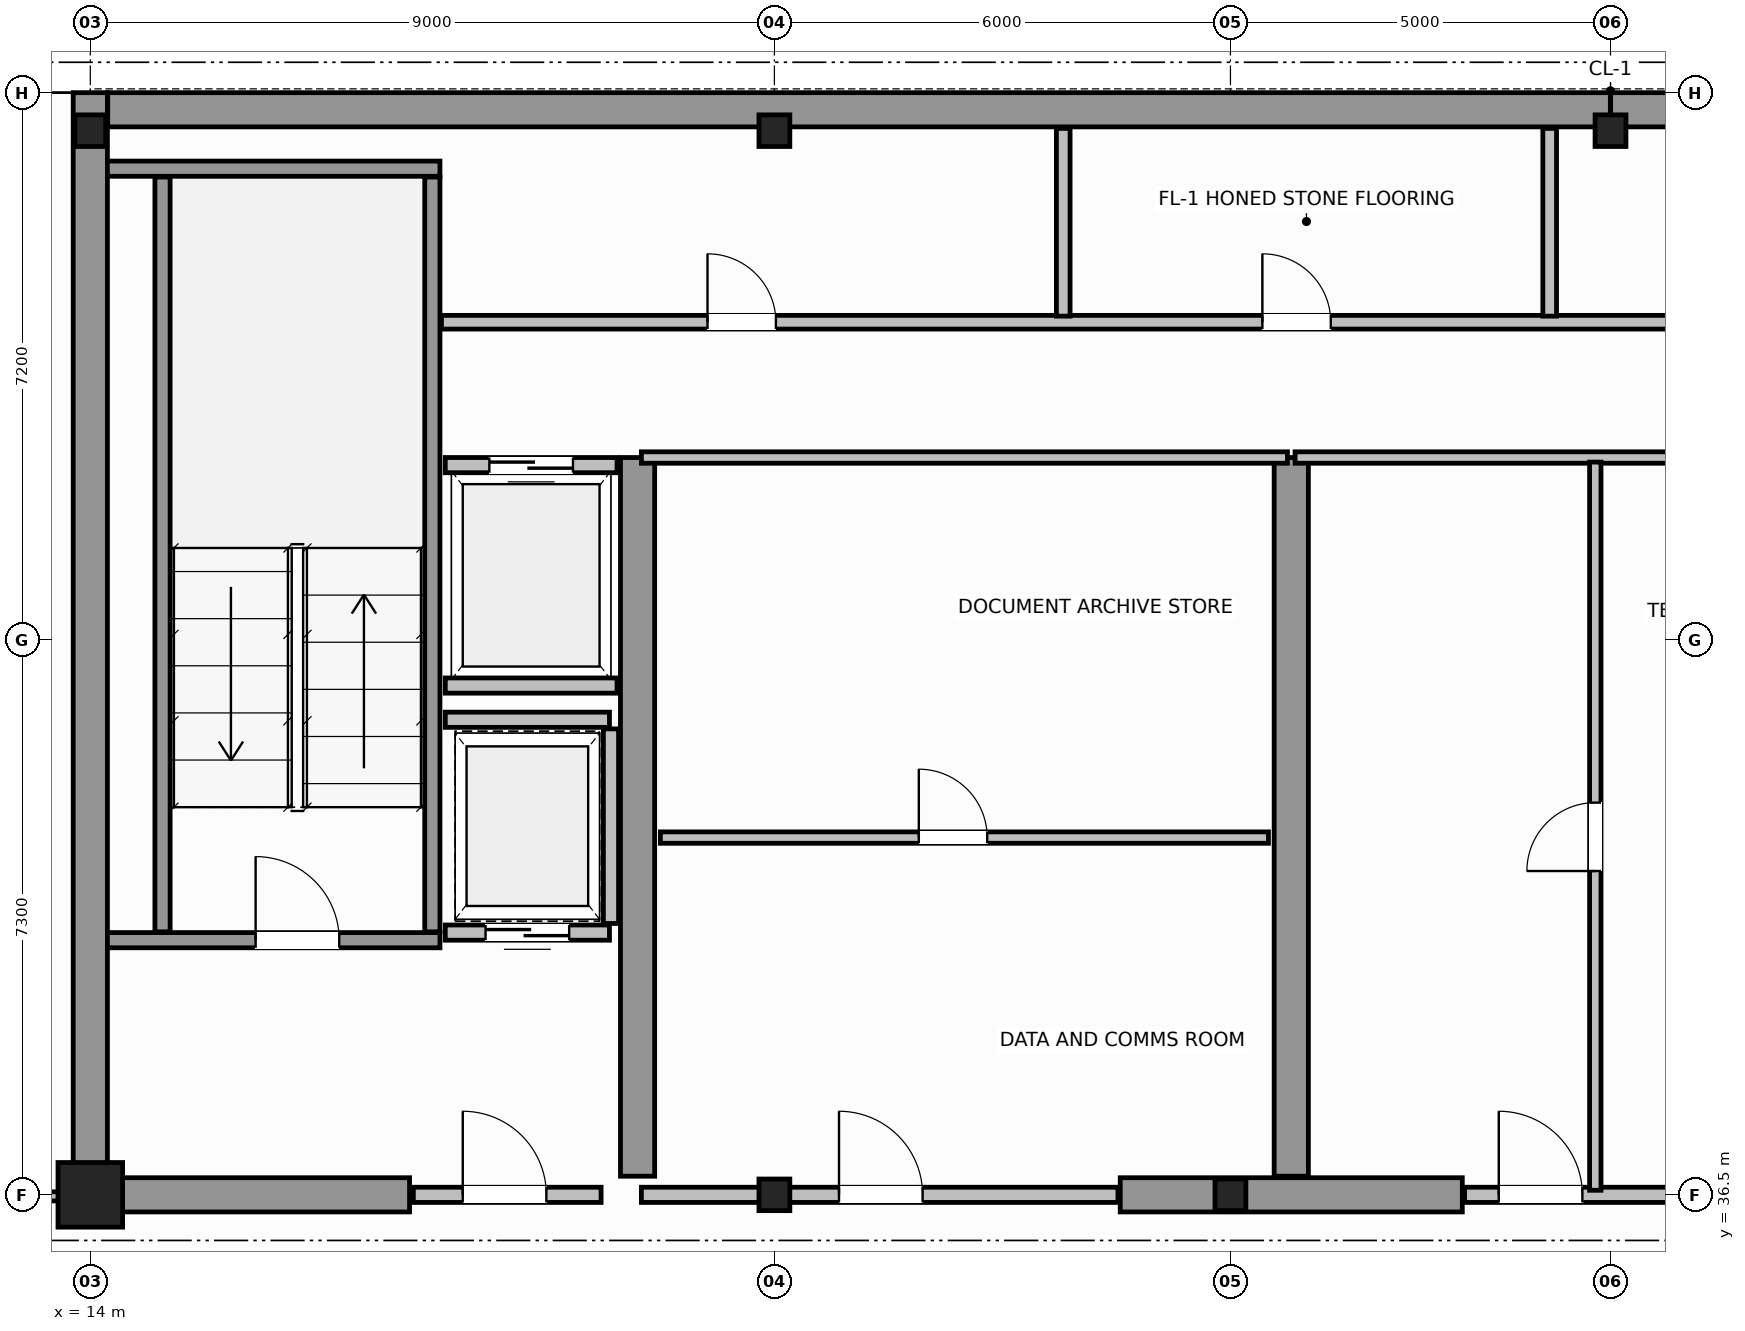
"""IFC4 building model, lengths in metres.
Left out: names, types, materials, properties, quantities, classifications, styles, units other than length and angle.
Written with IfcOpenShell. Run it as: python <this file> out.ifc"""

import sys

from ifc_helpers import new_model, si_unit, direction, frame, frame_2d, origin, origin_2d, place, context, subcontext, project, spatial, rectangle, i_section, extrude, source, transform, mapped, element, fill, save


model = new_model("IFC4")
c1 = context("Model", 3, precision=1e-05, world=origin(), true_north=direction((0.0, 1.0)))
c2 = subcontext(c1, "Body", "Model", "MODEL_VIEW")
j1 = project(units=[si_unit("LENGTHUNIT", "METRE"), si_unit("PLANEANGLEUNIT", "RADIAN")], contexts=[c1])
p1 = place(None, origin())
s1 = spatial("IfcSite", under=j1, at=p1, CompositionType="ELEMENT")
p2 = place(p1, origin())
s2 = spatial("IfcBuilding", under=s1, at=p2, CompositionType="ELEMENT")
p3 = place(p2, frame((0.0, 0.0, 272.6)))
s3 = spatial("IfcBuildingStorey", under=s2, at=p3, CompositionType="ELEMENT", Elevation=272.6)
m1 = source(origin(), c2, "Body", "SweptSolid", [
    extrude(rectangle(XDim=0.85, YDim=0.85, at=origin_2d()), origin(), (0.0, 0.0, 1.0), 3.8),
])
p4 = place(p3, frame((14.0, 36.5, 0.0), z_axis=(0.0, 0.0, 1.0), x_axis=(1.0, 0.0, 0.0)))
e1 = element("IfcColumn", 1, at=p4, inside=s3, PredefinedType="COLUMN", context=c2, shape_type="MappedRepresentation", body=[
    mapped(m1, transform((0.0, 0.0, 0.0), scale=1.0)),
])
m2 = source(origin(), c2, "Body", "SweptSolid", [
    extrude(i_section(OverallWidth=0.406, OverallDepth=0.416, WebThickness=0.03, FlangeThickness=0.042, FilletRadius=0.015, at=origin_2d()), origin(), (0.0, 0.0, 1.0), 3.8),
])
for number, where, z_axis, x_axis in (
    (2, (23.0, 36.5, 0.0), (0.0, 0.0, 1.0), (1.0, 0.0, 0.0)),
    (3, (29.0, 36.5, 0.0), (0.0, 0.0, 1.0), (1.0, 0.0, 0.0)),
    (4, (14.0, 50.5, 0.0), (0.0, 0.0, 1.0), (1.0, 0.0, 0.0)),
    (5, (23.0, 50.5, 0.0), (0.0, 0.0, 1.0), (1.0, 0.0, 0.0)),
    (6, (34.0, 50.5, 0.0), (0.0, 0.0, 1.0), (1.0, 0.0, 0.0)),
):
    element("IfcColumn", number, at=place(p3, frame(where, z_axis=z_axis, x_axis=x_axis)), inside=s3, PredefinedType="COLUMN", context=c2, shape_type="MappedRepresentation", body=[
        mapped(m2, transform((0.0, 0.0, 0.0), scale=1.0)),
    ])
for number, where, z_axis, x_axis in (
    (7, (14.229, 50.775, 0.0), (0.0, 0.0, 1.0), (1.0, 0.0, 0.0)),
    (8, (34.002, 50.775, 0.0), (0.0, 0.0, 1.0), (1.0, 0.0, 0.0)),
):
    element("IfcWall", number, at=place(p3, frame(where, z_axis=z_axis, x_axis=x_axis)), inside=s3, PredefinedType="SHEAR", context=c2, shape_type="SweptSolid", body=[
        extrude(rectangle(XDim=19.769, YDim=0.45, at=frame_2d((9.885, 0.0))), origin(), (0.0, 0.0, 1.0), 3.8),
    ])
p5 = place(p3, frame((14.0, 36.5, 0.0), z_axis=(0.0, 0.0, 1.0), x_axis=(0.0, 1.0, 0.0)))
e9 = element("IfcWall", 9, at=p5, inside=s3, PredefinedType="SHEAR", context=c2, shape_type="SweptSolid", body=[
    extrude(rectangle(XDim=14.5, YDim=0.45, at=frame_2d((7.25, 0.0))), origin(), (0.0, 0.0, 1.0), 3.8),
])
p6 = place(p3, frame((14.245, 36.5, 0.0), z_axis=(0.0, 0.0, 1.0), x_axis=(1.0, 0.0, 0.0)))
e10 = element("IfcWall", 10, at=p6, inside=s3, PredefinedType="SHEAR", context=c2, shape_type="SweptSolid", body=[
    extrude(rectangle(XDim=3.955, YDim=0.45, at=frame_2d((1.978, 0.0))), origin(), (0.0, 0.0, 1.0), 2.58),
])
p7 = place(p3, frame((27.55, 36.5, 0.0), z_axis=(0.0, 0.0, 1.0), x_axis=(1.0, 0.0, 0.0)))
e11 = element("IfcWall", 11, at=p7, inside=s3, PredefinedType="SHEAR", context=c2, shape_type="SweptSolid", body=[
    extrude(rectangle(XDim=4.5, YDim=0.45, at=frame_2d((2.25, 0.0))), origin(), (0.0, 0.0, 1.0), 3.8),
])
for number, where, z_axis, x_axis in (
    (12, (21.2, 36.745, 0.0), (0.0, 0.0, 1.0), (0.0, 1.0, 0.0)),
    (13, (29.8, 36.745, 0.0), (0.0, 0.0, 1.0), (0.0, 1.0, 0.0)),
):
    element("IfcWall", number, at=place(p3, frame(where, z_axis=z_axis, x_axis=x_axis)), inside=s3, PredefinedType="SHEAR", context=c2, shape_type="SweptSolid", body=[
        extrude(rectangle(XDim=9.455, YDim=0.45, at=frame_2d((4.728, 0.0))), origin(), (0.0, 0.0, 1.0), 3.8),
    ])
p8 = place(p3, frame((14.225, 39.85, 0.0), z_axis=(0.0, 0.0, 1.0), x_axis=(1.0, 0.0, 0.0)))
e14 = element("IfcWall", 14, at=p8, inside=s3, PredefinedType="SOLIDWALL", context=c2, shape_type="SweptSolid", body=[
    extrude(rectangle(XDim=4.375, YDim=0.2, at=frame_2d((2.188, 0.0))), origin(), (0.0, 0.0, 1.0), 3.8),
])
p9 = place(p8, frame((1.95, 0.0, 0.0)))
e15 = element("IfcOpeningElement", 15, at=p9, cuts=e14, PredefinedType="OPENING", context=c2, shape_type="SweptSolid", body=[
    extrude(rectangle(XDim=1.1, YDim=2.15, at=frame_2d((0.55, 1.075))), frame((0.0, 0.11, 0.0), z_axis=(0.0, -1.0, 0.0), x_axis=(1.0, 0.0, 0.0)), (0.0, 0.0, 1.0), 0.22),
])
p10 = place(p3, frame((14.225, 50.0, 0.0), z_axis=(0.0, 0.0, 1.0), x_axis=(1.0, 0.0, 0.0)))
e16 = element("IfcWall", 16, at=p10, inside=s3, PredefinedType="SOLIDWALL", context=c2, shape_type="SweptSolid", body=[
    extrude(rectangle(XDim=4.375, YDim=0.2, at=frame_2d((2.188, 0.0))), origin(), (0.0, 0.0, 1.0), 3.8),
])
for number, where, z_axis, x_axis in (
    (17, (14.95, 39.96, 0.0), (0.0, 0.0, 1.0), (0.0, 1.0, 0.0)),
    (18, (18.5, 39.96, 0.0), (0.0, 0.0, 1.0), (0.0, 1.0, 0.0)),
):
    element("IfcWall", number, at=place(p3, frame(where, z_axis=z_axis, x_axis=x_axis)), inside=s3, PredefinedType="SOLIDWALL", context=c2, shape_type="SweptSolid", body=[
        extrude(rectangle(XDim=9.93, YDim=0.2, at=frame_2d((4.965, 0.0))), origin(), (0.0, 0.0, 1.0), 3.8),
    ])
p11 = place(p3, frame((18.25, 36.5, 0.0), z_axis=(0.0, 0.0, 1.0), x_axis=(1.0, 0.0, 0.0)))
e19 = element("IfcWall", 19, at=p11, inside=s3, PredefinedType="SOLIDWALL", context=c2, shape_type="SweptSolid", body=[
    extrude(rectangle(XDim=2.47, YDim=0.2, at=frame_2d((1.235, 0.0))), origin(), (0.0, 0.0, 1.0), 2.57),
])
p12 = place(p11, frame((0.65, 0.0, 0.0)))
e20 = element("IfcOpeningElement", 20, at=p12, cuts=e19, PredefinedType="OPENING", context=c2, shape_type="SweptSolid", body=[
    extrude(rectangle(XDim=1.1, YDim=2.15, at=frame_2d((0.55, 1.075))), frame((0.0, 0.11, 0.0), z_axis=(0.0, -1.0, 0.0), x_axis=(1.0, 0.0, 0.0)), (0.0, 0.0, 1.0), 0.22),
])
p13 = place(p3, frame((18.67, 46.1, 0.0), z_axis=(0.0, 0.0, 1.0), x_axis=(1.0, 0.0, 0.0)))
e21 = element("IfcWall", 21, at=p13, inside=s3, PredefinedType="SOLIDWALL", context=c2, shape_type="SweptSolid", body=[
    extrude(rectangle(XDim=2.26, YDim=0.2, at=frame_2d((1.13, 0.0))), origin(), (0.0, 0.0, 1.0), 3.58),
])
p14 = place(p13, frame((0.58, 0.0, 0.0)))
e22 = element("IfcOpeningElement", 22, at=p14, cuts=e21, PredefinedType="OPENING", context=c2, shape_type="SweptSolid", body=[
    extrude(rectangle(XDim=1.1, YDim=2.15, at=frame_2d((0.55, 1.075))), frame((0.0, 0.11, 0.0), z_axis=(0.0, -1.0, 0.0), x_axis=(1.0, 0.0, 0.0)), (0.0, 0.0, 1.0), 0.22),
])
p15 = place(p3, frame((18.67, 43.2, 0.0), z_axis=(0.0, 0.0, 1.0), x_axis=(1.0, 0.0, 0.0)))
e23 = element("IfcWall", 23, at=p15, inside=s3, PredefinedType="SOLIDWALL", context=c2, shape_type="SweptSolid", body=[
    extrude(rectangle(XDim=2.26, YDim=0.2, at=frame_2d((1.13, 0.0))), origin(), (0.0, 0.0, 1.0), 3.58),
])
p16 = place(p3, frame((18.67, 39.95, 0.0), z_axis=(0.0, 0.0, 1.0), x_axis=(1.0, 0.0, 0.0)))
e24 = element("IfcWall", 24, at=p16, inside=s3, PredefinedType="SOLIDWALL", context=c2, shape_type="SweptSolid", body=[
    extrude(rectangle(XDim=2.16, YDim=0.2, at=frame_2d((1.08, 0.0))), origin(), (0.0, 0.0, 1.0), 3.58),
])
p17 = place(p16, frame((0.53, 0.0, 0.0)))
e25 = element("IfcOpeningElement", 25, at=p17, cuts=e24, PredefinedType="OPENING", context=c2, shape_type="SweptSolid", body=[
    extrude(rectangle(XDim=1.1, YDim=2.15, at=frame_2d((0.55, 1.075))), frame((0.0, 0.11, 0.0), z_axis=(0.0, -1.0, 0.0), x_axis=(1.0, 0.0, 0.0)), (0.0, 0.0, 1.0), 0.22),
])
p18 = place(p3, frame((18.67, 42.75, 0.0), z_axis=(0.0, 0.0, 1.0), x_axis=(1.0, 0.0, 0.0)))
e26 = element("IfcWall", 26, at=p18, inside=s3, PredefinedType="SOLIDWALL", context=c2, shape_type="SweptSolid", body=[
    extrude(rectangle(XDim=2.16, YDim=0.2, at=frame_2d((1.08, 0.0))), origin(), (0.0, 0.0, 1.0), 3.58),
])
p19 = place(p3, frame((20.85, 40.07, 0.0), z_axis=(0.0, 0.0, 1.0), x_axis=(0.0, 1.0, 0.0)))
e27 = element("IfcWall", 27, at=p19, inside=s3, PredefinedType="SOLIDWALL", context=c2, shape_type="SweptSolid", body=[
    extrude(rectangle(XDim=2.56, YDim=0.2, at=frame_2d((1.28, 0.0))), origin(), (0.0, 0.0, 1.0), 3.58),
])
p20 = place(p3, frame((21.25, 36.5, 0.0), z_axis=(0.0, 0.0, 1.0), x_axis=(1.0, 0.0, 0.0)))
e28 = element("IfcWall", 28, at=p20, inside=s3, PredefinedType="SOLIDWALL", context=c2, shape_type="SweptSolid", body=[
    extrude(rectangle(XDim=6.27, YDim=0.2, at=frame_2d((3.135, 0.0))), origin(), (0.0, 0.0, 1.0), 2.57),
])
p21 = place(p20, frame((2.6, 0.0, 0.0)))
e29 = element("IfcOpeningElement", 29, at=p21, cuts=e28, PredefinedType="OPENING", context=c2, shape_type="SweptSolid", body=[
    extrude(rectangle(XDim=1.1, YDim=2.15, at=frame_2d((0.55, 1.075))), frame((0.0, 0.11, 0.0), z_axis=(0.0, -1.0, 0.0), x_axis=(1.0, 0.0, 0.0)), (0.0, 0.0, 1.0), 0.22),
])
p22 = place(p3, frame((21.25, 46.2, 0.0), z_axis=(0.0, 0.0, 1.0), x_axis=(1.0, 0.0, 0.0)))
e30 = element("IfcWall", 30, at=p22, inside=s3, PredefinedType="PARTITIONING", context=c2, shape_type="SweptSolid", body=[
    extrude(rectangle(XDim=8.5, YDim=0.15, at=frame_2d((4.25, 0.0))), origin(), (0.0, 0.0, 1.0), 3.58),
])
p23 = place(p3, frame((21.5, 41.2, 0.0), z_axis=(0.0, 0.0, 1.0), x_axis=(1.0, 0.0, 0.0)))
e31 = element("IfcWall", 31, at=p23, inside=s3, PredefinedType="PARTITIONING", context=c2, shape_type="SweptSolid", body=[
    extrude(rectangle(XDim=8.0, YDim=0.15, at=frame_2d((4.0, 0.0))), origin(), (0.0, 0.0, 1.0), 3.58),
])
p24 = place(p23, frame((3.4, 0.0, 0.0)))
e32 = element("IfcOpeningElement", 32, at=p24, cuts=e31, PredefinedType="OPENING", context=c2, shape_type="SweptSolid", body=[
    extrude(rectangle(XDim=0.9, YDim=2.1, at=frame_2d((0.45, 1.05))), frame((0.0, 0.085, 0.0), z_axis=(0.0, -1.0, 0.0), x_axis=(1.0, 0.0, 0.0)), (0.0, 0.0, 1.0), 0.17),
])
p25 = place(p3, frame((32.08, 36.5, 0.0), z_axis=(0.0, 0.0, 1.0), x_axis=(1.0, 0.0, 0.0)))
e33 = element("IfcWall", 33, at=p25, inside=s3, PredefinedType="SOLIDWALL", context=c2, shape_type="SweptSolid", body=[
    extrude(rectangle(XDim=4.04, YDim=0.2, at=frame_2d((2.02, 0.0))), origin(), (0.0, 0.0, 1.0), 3.02),
])
p26 = place(p25, frame((0.45, 0.0, 0.0)))
e34 = element("IfcOpeningElement", 34, at=p26, cuts=e33, PredefinedType="OPENING", context=c2, shape_type="SweptSolid", body=[
    extrude(rectangle(XDim=1.1, YDim=2.15, at=frame_2d((0.55, 1.075))), frame((0.0, 0.11, 0.0), z_axis=(0.0, -1.0, 0.0), x_axis=(1.0, 0.0, 0.0)), (0.0, 0.0, 1.0), 0.22),
])
p27 = place(p3, frame((29.85, 46.2, 0.0), z_axis=(0.0, 0.0, 1.0), x_axis=(1.0, 0.0, 0.0)))
e35 = element("IfcWall", 35, at=p27, inside=s3, PredefinedType="PARTITIONING", context=c2, shape_type="SweptSolid", body=[
    extrude(rectangle(XDim=8.5, YDim=0.15, at=frame_2d((4.25, 0.0))), origin(), (0.0, 0.0, 1.0), 3.58),
])
p28 = place(p3, frame((33.8, 36.56, 0.0), z_axis=(0.0, 0.0, 1.0), x_axis=(0.0, 1.0, 0.0)))
e36 = element("IfcWall", 36, at=p28, inside=s3, PredefinedType="PARTITIONING", context=c2, shape_type="SweptSolid", body=[
    extrude(rectangle(XDim=9.58, YDim=0.15, at=frame_2d((4.79, 0.0))), origin(), (0.0, 0.0, 1.0), 3.58),
])
p29 = place(p28, frame((4.2, 0.0, 0.0)))
e37 = element("IfcOpeningElement", 37, at=p29, cuts=e36, PredefinedType="OPENING", context=c2, shape_type="SweptSolid", body=[
    extrude(rectangle(XDim=0.9, YDim=2.1, at=frame_2d((0.45, 1.05))), frame((0.0, 0.085, 0.0), z_axis=(0.0, -1.0, 0.0), x_axis=(1.0, 0.0, 0.0)), (0.0, 0.0, 1.0), 0.17),
])
p30 = place(p3, frame((18.62, 47.98, 0.0), z_axis=(0.0, 0.0, 1.0), x_axis=(1.0, 0.0, 0.0)))
e38 = element("IfcWall", 38, at=p30, inside=s3, PredefinedType="PLUMBINGWALL", context=c2, shape_type="SweptSolid", body=[
    extrude(rectangle(XDim=20.06, YDim=0.18, at=frame_2d((10.03, 0.0))), origin(), (0.0, 0.0, 1.0), 3.58),
])
p31 = place(p30, frame((3.5, 0.0, 0.0)))
e39 = element("IfcOpeningElement", 39, at=p31, cuts=e38, PredefinedType="OPENING", context=c2, shape_type="SweptSolid", body=[
    extrude(rectangle(XDim=0.9, YDim=2.15, at=frame_2d((0.45, 1.075))), frame((0.0, 0.1, 0.0), z_axis=(0.0, -1.0, 0.0), x_axis=(1.0, 0.0, 0.0)), (0.0, 0.0, 1.0), 0.2),
])
p32 = place(p30, frame((10.8, 0.0, 0.0)))
e40 = element("IfcOpeningElement", 40, at=p32, cuts=e38, PredefinedType="OPENING", context=c2, shape_type="SweptSolid", body=[
    extrude(rectangle(XDim=0.9, YDim=2.15, at=frame_2d((0.45, 1.075))), frame((0.0, 0.1, 0.0), z_axis=(0.0, -1.0, 0.0), x_axis=(1.0, 0.0, 0.0)), (0.0, 0.0, 1.0), 0.2),
])
p33 = place(p30, frame((16.8, 0.0, 0.0)))
e41 = element("IfcOpeningElement", 41, at=p33, cuts=e38, PredefinedType="OPENING", context=c2, shape_type="SweptSolid", body=[
    extrude(rectangle(XDim=0.9, YDim=2.15, at=frame_2d((0.45, 1.075))), frame((0.0, 0.1, 0.0), z_axis=(0.0, -1.0, 0.0), x_axis=(1.0, 0.0, 0.0)), (0.0, 0.0, 1.0), 0.2),
])
for number, where, z_axis, x_axis in (
    (42, (26.8, 48.06, 0.0), (0.0, 0.0, 1.0), (0.0, 1.0, 0.0)),
    (43, (33.2, 48.06, 0.0), (0.0, 0.0, 1.0), (0.0, 1.0, 0.0)),
):
    element("IfcWall", number, at=place(p3, frame(where, z_axis=z_axis, x_axis=x_axis)), inside=s3, PredefinedType="PLUMBINGWALL", context=c2, shape_type="SweptSolid", body=[
        extrude(rectangle(XDim=2.47, YDim=0.18, at=frame_2d((1.235, 0.0))), origin(), (0.0, 0.0, 1.0), 3.58),
    ])
p34 = place(p3, frame((7.336, 36.48, 0.0), z_axis=(0.0, 0.0, 1.0), x_axis=(1.0, 0.0, 0.0)))
e44 = element("IfcWall", 44, at=p34, inside=s3, PredefinedType="PARTITIONING", context=c2, shape_type="SweptSolid", body=[
    extrude(rectangle(XDim=6.604, YDim=0.12, at=frame_2d((3.302, 0.0))), origin(), (0.0, 0.0, 1.0), 3.02),
])
p35 = place(p34, frame((2.852, 0.0, 0.0)))
e45 = element("IfcOpeningElement", 45, at=p35, cuts=e44, PredefinedType="OPENING", context=c2, shape_type="SweptSolid", body=[
    extrude(rectangle(XDim=0.9, YDim=2.15, at=frame_2d((0.45, 1.075))), frame((0.0, 0.07, 0.0), z_axis=(0.0, -1.0, 0.0), x_axis=(1.0, 0.0, 0.0)), (0.0, 0.0, 1.0), 0.14),
])
m3 = source(origin(), c2, "Body", "SweptSolid", [
    extrude(rectangle(XDim=1.1, YDim=2.15, at=frame_2d((0.55, 1.075))), frame((0.0, 0.025, 0.0), z_axis=(0.0, -1.0, 0.0), x_axis=(1.0, 0.0, 0.0)), (0.0, 0.0, 1.0), 0.05),
])
p36 = place(p9, origin())
e46 = element("IfcDoor", 46, at=p36, inside=s3, OperationType="SINGLE_SWING_LEFT", PredefinedType="DOOR", context=c2, shape_type="MappedRepresentation", body=[
    mapped(m3, transform((0.0, 0.0, 0.0), scale=1.0)),
])
fill(e15, e46)
p37 = place(p12, origin())
e47 = element("IfcDoor", 47, at=p37, inside=s3, OperationType="SINGLE_SWING_RIGHT", PredefinedType="DOOR", context=c2, shape_type="MappedRepresentation", body=[
    mapped(m3, transform((0.0, 0.0, 0.0), scale=1.0)),
])
fill(e20, e47)
p38 = place(p14, origin())
e48 = element("IfcDoor", 48, at=p38, inside=s3, OperationType="DOUBLE_DOOR_SLIDING", PredefinedType="DOOR", context=c2, shape_type="MappedRepresentation", body=[
    mapped(m3, transform((0.0, 0.0, 0.0), scale=1.0)),
])
fill(e22, e48)
p39 = place(p17, origin())
e49 = element("IfcDoor", 49, at=p39, inside=s3, OperationType="DOUBLE_DOOR_SLIDING", PredefinedType="DOOR", context=c2, shape_type="MappedRepresentation", body=[
    mapped(m3, transform((0.0, 0.0, 0.0), scale=1.0)),
])
fill(e25, e49)
p40 = place(p21, origin())
e50 = element("IfcDoor", 50, at=p40, inside=s3, OperationType="SINGLE_SWING_LEFT", PredefinedType="DOOR", context=c2, shape_type="MappedRepresentation", body=[
    mapped(m3, transform((0.0, 0.0, 0.0), scale=1.0)),
])
fill(e29, e50)
m4 = source(origin(), c2, "Body", "SweptSolid", [
    extrude(rectangle(XDim=0.9, YDim=2.1, at=frame_2d((0.45, 1.05))), frame((0.0, 0.025, 0.0), z_axis=(0.0, -1.0, 0.0), x_axis=(1.0, 0.0, 0.0)), (0.0, 0.0, 1.0), 0.05),
])
p41 = place(p24, origin())
e51 = element("IfcDoor", 51, at=p41, inside=s3, OperationType="SINGLE_SWING_RIGHT", PredefinedType="DOOR", context=c2, shape_type="MappedRepresentation", body=[
    mapped(m4, transform((0.0, 0.0, 0.0), scale=1.0)),
])
fill(e32, e51)
p42 = place(p26, origin())
e52 = element("IfcDoor", 52, at=p42, inside=s3, OperationType="SINGLE_SWING_LEFT", PredefinedType="DOOR", context=c2, shape_type="MappedRepresentation", body=[
    mapped(m3, transform((0.0, 0.0, 0.0), scale=1.0)),
])
fill(e34, e52)
p43 = place(p29, origin())
e53 = element("IfcDoor", 53, at=p43, inside=s3, OperationType="SINGLE_SWING_RIGHT", PredefinedType="DOOR", context=c2, shape_type="MappedRepresentation", body=[
    mapped(m4, transform((0.0, 0.0, 0.0), scale=1.0)),
])
fill(e37, e53)
m5 = source(origin(), c2, "Body", "SweptSolid", [
    extrude(rectangle(XDim=0.9, YDim=2.15, at=frame_2d((0.45, 1.075))), frame((0.0, 0.025, 0.0), z_axis=(0.0, -1.0, 0.0), x_axis=(1.0, 0.0, 0.0)), (0.0, 0.0, 1.0), 0.05),
])
p44 = place(p31, origin())
e54 = element("IfcDoor", 54, at=p44, inside=s3, OperationType="SINGLE_SWING_LEFT", PredefinedType="DOOR", context=c2, shape_type="MappedRepresentation", body=[
    mapped(m5, transform((0.0, 0.0, 0.0), scale=1.0)),
])
fill(e39, e54)
p45 = place(p32, origin())
e55 = element("IfcDoor", 55, at=p45, inside=s3, OperationType="SINGLE_SWING_RIGHT", PredefinedType="DOOR", context=c2, shape_type="MappedRepresentation", body=[
    mapped(m5, transform((0.0, 0.0, 0.0), scale=1.0)),
])
fill(e40, e55)
save(model, sys.argv[1])
